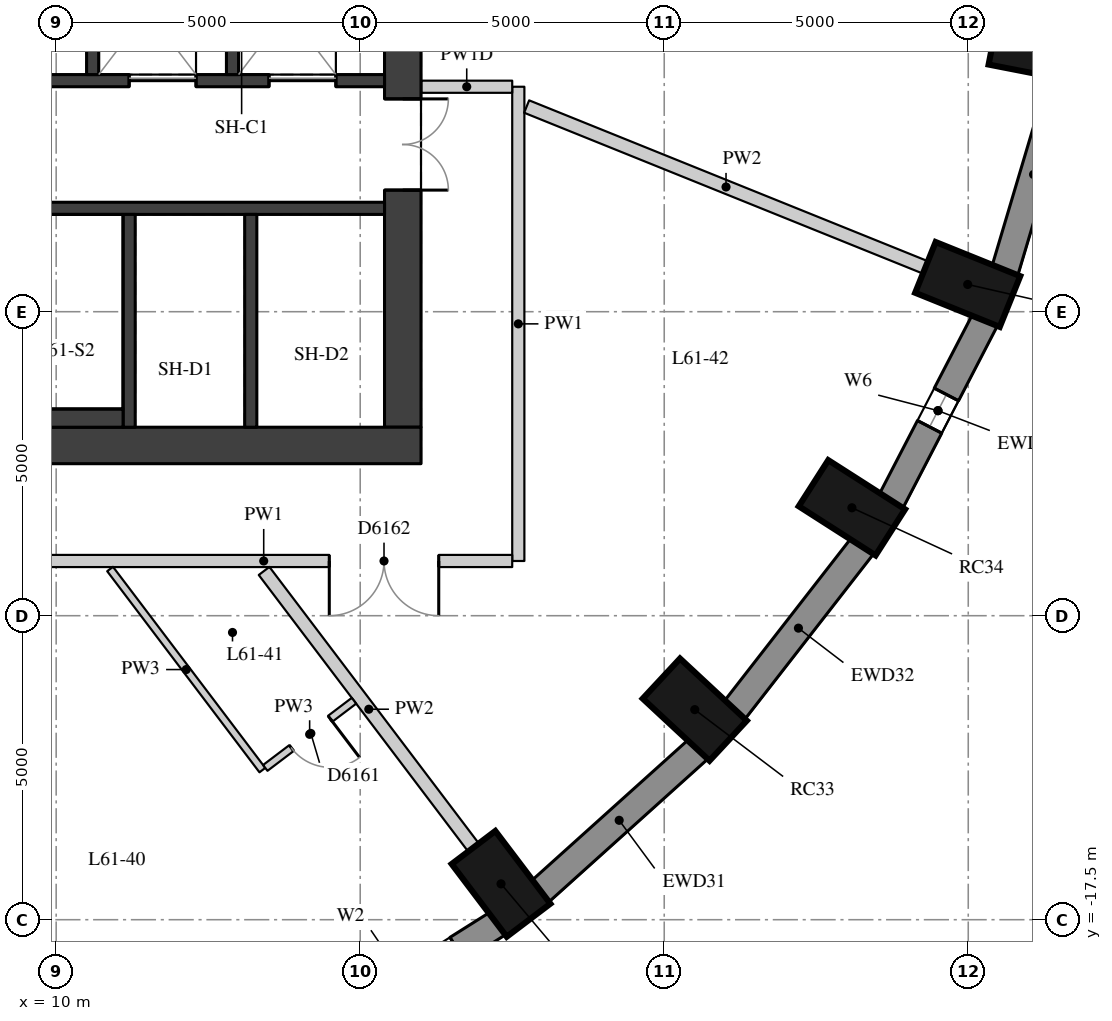
"""IFC4 building model, lengths in metres.
Left out: names, types, materials, properties, quantities, classifications, styles, units other than length and angle.
Written with IfcOpenShell. Run it as: python <this file> out.ifc"""

import sys

from ifc_helpers import new_model, si_unit, direction, frame, frame_2d, origin, origin_2d, place, context, subcontext, project, spatial, rectangle, extrude, element, fill, save


model = new_model("IFC4")
c1 = context("Model", 3, precision=1e-05, world=origin(), true_north=direction((0.0, 1.0)))
c2 = subcontext(c1, "Body", "Model", "MODEL_VIEW")
j1 = project(units=[si_unit("LENGTHUNIT", "METRE"), si_unit("PLANEANGLEUNIT", "RADIAN")], contexts=[c1])
p1 = place(None, origin())
s1 = spatial("IfcSite", under=j1, at=p1, CompositionType="ELEMENT")
p2 = place(p1, origin())
s2 = spatial("IfcBuilding", under=s1, at=p2, CompositionType="ELEMENT")
p3 = place(p2, frame((0.0, 0.0, 215.6)))
s3 = spatial("IfcBuildingStorey", under=s2, at=p3, CompositionType="ELEMENT", Elevation=215.6)
for number, where, z_axis, x_axis in (
    (1, (17.316, -16.911, 0.0), (0.0, 0.0, 1.0), (0.604, -0.797, 0.0)),
    (2, (20.502, -14.045, 0.0), (0.0, 0.0, 1.0), (0.732, -0.681, 0.0)),
    (3, (23.087, -10.725, 0.0), (0.0, 0.0, 1.0), (0.842, -0.539, 0.0)),
    (4, (24.991, -7.052, 0.0), (0.0, 0.0, 1.0), (0.927, -0.374, 0.0)),
    (5, (26.157, -3.137, 0.0), (0.0, 0.0, 1.0), (0.981, -0.192, 0.0)),
):
    element("IfcColumn", number, at=place(p3, frame(where, z_axis=z_axis, x_axis=x_axis)), inside=s3, PredefinedType="COLUMN", context=c2, shape_type="SweptSolid", body=[
        extrude(rectangle(XDim=1.5, YDim=0.9, at=origin_2d()), origin(), (0.0, 0.0, 1.0), 3.3),
    ])
p4 = place(p3, frame((14.232, -19.47, 0.0), z_axis=(0.0, 0.0, 1.0), x_axis=(0.84614984472, 0.532945063098, 0.0)))
e6 = element("IfcWall", 6, at=p4, inside=s3, PredefinedType="SOLIDWALL", context=c2, shape_type="SweptSolid", body=[
    extrude(rectangle(XDim=3.586, YDim=0.45, at=frame_2d((1.793, 0.0))), origin(), (0.0, 0.0, 1.0), 3.02),
])
p5 = place(p4, frame((0.793, 0.0, 0.4)))
e7 = element("IfcOpeningElement", 7, at=p5, cuts=e6, PredefinedType="OPENING", context=c2, shape_type="SweptSolid", body=[
    extrude(rectangle(XDim=2.0, YDim=1.75, at=frame_2d((1.0, 0.875))), frame((0.0, 0.235, 0.0), z_axis=(0.0, -1.0, 0.0), x_axis=(1.0, 0.0, 0.0)), (0.0, 0.0, 1.0), 0.47),
])
p6 = place(p3, frame((17.953, -17.04, 0.0), z_axis=(0.0, 0.0, 1.0), x_axis=(0.743442727602, 0.668799604348, 0.0)))
e8 = element("IfcWall", 8, at=p6, inside=s3, PredefinedType="SOLIDWALL", context=c2, shape_type="SweptSolid", body=[
    extrude(rectangle(XDim=3.513, YDim=0.45, at=frame_2d((1.756, 0.0))), origin(), (0.0, 0.0, 1.0), 3.02),
])
p7 = place(p3, frame((21.151, -14.061, 0.0), z_axis=(0.0, 0.0, 1.0), x_axis=(0.614255239631, 0.789107407509, 0.0)))
e9 = element("IfcWall", 9, at=p7, inside=s3, PredefinedType="SOLIDWALL", context=c2, shape_type="SweptSolid", body=[
    extrude(rectangle(XDim=3.438, YDim=0.45, at=frame_2d((1.719, 0.0))), origin(), (0.0, 0.0, 1.0), 3.02),
])
p8 = place(p3, frame((23.727, -10.624, 0.0), z_axis=(0.0, 0.0, 1.0), x_axis=(0.460175500475, 0.887827972505, 0.0)))
e10 = element("IfcWall", 10, at=p8, inside=s3, PredefinedType="SOLIDWALL", context=c2, shape_type="SweptSolid", body=[
    extrude(rectangle(XDim=3.371, YDim=0.45, at=frame_2d((1.685, 0.0))), origin(), (0.0, 0.0, 1.0), 3.02),
])
p9 = place(p8, frame((1.385, 0.0, 0.4)))
e11 = element("IfcOpeningElement", 11, at=p9, cuts=e10, PredefinedType="OPENING", context=c2, shape_type="SweptSolid", body=[
    extrude(rectangle(XDim=0.6, YDim=1.75, at=frame_2d((0.3, 0.875))), frame((0.0, 0.235, 0.0), z_axis=(0.0, -1.0, 0.0), x_axis=(1.0, 0.0, 0.0)), (0.0, 0.0, 1.0), 0.47),
])
p10 = place(p3, frame((25.6, -6.834, 0.0), z_axis=(0.0, 0.0, 1.0), x_axis=(0.285444972963, 0.958395099847, 0.0)))
e12 = element("IfcWall", 12, at=p10, inside=s3, PredefinedType="SOLIDWALL", context=c2, shape_type="SweptSolid", body=[
    extrude(rectangle(XDim=3.32, YDim=0.45, at=frame_2d((1.66, 0.0))), origin(), (0.0, 0.0, 1.0), 3.02),
])
p11 = place(p3, frame((15.7, -9.4, 0.0), z_axis=(0.0, 0.0, 1.0), x_axis=(0.0, 1.0, 0.0)))
e13 = element("IfcWall", 13, at=p11, inside=s3, PredefinedType="SHEAR", context=c2, shape_type="SweptSolid", body=[
    extrude(rectangle(XDim=18.8, YDim=0.6, at=frame_2d((9.4, 0.0))), origin(), (0.0, 0.0, 1.0), 3.02),
])
p12 = place(p11, frame((13.4, 0.0, 0.0)))
e14 = element("IfcOpeningElement", 14, at=p12, cuts=e13, PredefinedType="OPENING", context=c2, shape_type="SweptSolid", body=[
    extrude(rectangle(XDim=1.5, YDim=2.1, at=frame_2d((0.75, 1.05))), frame((0.0, 0.31, 0.0), z_axis=(0.0, -1.0, 0.0), x_axis=(1.0, 0.0, 0.0)), (0.0, 0.0, 1.0), 0.62),
])
p13 = place(p11, frame((3.9, 0.0, 0.0)))
e15 = element("IfcOpeningElement", 15, at=p13, cuts=e13, PredefinedType="OPENING", context=c2, shape_type="SweptSolid", body=[
    extrude(rectangle(XDim=1.5, YDim=2.1, at=frame_2d((0.75, 1.05))), frame((0.0, 0.31, 0.0), z_axis=(0.0, -1.0, 0.0), x_axis=(1.0, 0.0, 0.0)), (0.0, 0.0, 1.0), 0.62),
])
p14 = place(p3, frame((4.0, -9.7, 0.0), z_axis=(0.0, 0.0, 1.0), x_axis=(1.0, 0.0, 0.0)))
e16 = element("IfcWall", 16, at=p14, inside=s3, PredefinedType="SHEAR", context=c2, shape_type="SweptSolid", body=[
    extrude(rectangle(XDim=12.0, YDim=0.6, at=frame_2d((6.0, 0.0))), origin(), (0.0, 0.0, 1.0), 3.02),
])
p15 = place(p3, frame((4.6, -3.7, 0.0), z_axis=(0.0, 0.0, 1.0), x_axis=(1.0, 0.0, 0.0)))
e17 = element("IfcWall", 17, at=p15, inside=s3, PredefinedType="SHEAR", context=c2, shape_type="SweptSolid", body=[
    extrude(rectangle(XDim=10.8, YDim=0.2, at=frame_2d((5.4, 0.0))), origin(), (0.0, 0.0, 1.0), 3.02),
])
p16 = place(p15, frame((6.6, 0.0, 0.0)))
e18 = element("IfcOpeningElement", 18, at=p16, cuts=e17, PredefinedType="OPENING", context=c2, shape_type="SweptSolid", body=[
    extrude(rectangle(XDim=1.1, YDim=2.1, at=frame_2d((0.55, 1.05))), frame((0.0, 0.11, 0.0), z_axis=(0.0, -1.0, 0.0), x_axis=(1.0, 0.0, 0.0)), (0.0, 0.0, 1.0), 0.22),
])
p17 = place(p15, frame((8.9, 0.0, 0.0)))
e19 = element("IfcOpeningElement", 19, at=p17, cuts=e17, PredefinedType="OPENING", context=c2, shape_type="SweptSolid", body=[
    extrude(rectangle(XDim=1.1, YDim=2.1, at=frame_2d((0.55, 1.05))), frame((0.0, 0.11, 0.0), z_axis=(0.0, -1.0, 0.0), x_axis=(1.0, 0.0, 0.0)), (0.0, 0.0, 1.0), 0.22),
])
p18 = place(p3, frame((4.6, -5.8, 0.0), z_axis=(0.0, 0.0, 1.0), x_axis=(1.0, 0.0, 0.0)))
e20 = element("IfcWall", 20, at=p18, inside=s3, PredefinedType="SHEAR", context=c2, shape_type="SweptSolid", body=[
    extrude(rectangle(XDim=10.8, YDim=0.2, at=frame_2d((5.4, 0.0))), origin(), (0.0, 0.0, 1.0), 3.02),
])
for number, where, z_axis, x_axis in (
    (21, (11.2, -9.4, 0.0), (0.0, 0.0, 1.0), (0.0, 1.0, 0.0)),
    (22, (13.2, -9.4, 0.0), (0.0, 0.0, 1.0), (0.0, 1.0, 0.0)),
):
    element("IfcWall", number, at=place(p3, frame(where, z_axis=z_axis, x_axis=x_axis)), inside=s3, PredefinedType="SHEAR", context=c2, shape_type="SweptSolid", body=[
        extrude(rectangle(XDim=3.5, YDim=0.2, at=frame_2d((1.75, 0.0))), origin(), (0.0, 0.0, 1.0), 3.02),
    ])
for number, where, z_axis, x_axis in (
    (23, (10.6, -3.6, 0.0), (0.0, 0.0, 1.0), (0.0, 1.0, 0.0)),
    (24, (12.9, -3.6, 0.0), (0.0, 0.0, 1.0), (0.0, 1.0, 0.0)),
):
    element("IfcWall", number, at=place(p3, frame(where, z_axis=z_axis, x_axis=x_axis)), inside=s3, PredefinedType="SHEAR", context=c2, shape_type="SweptSolid", body=[
        extrude(rectangle(XDim=2.5, YDim=0.2, at=frame_2d((1.25, 0.0))), origin(), (0.0, 0.0, 1.0), 3.02),
    ])
p19 = place(p3, frame((6.22, -9.25, 0.0), z_axis=(0.0, 0.0, 1.0), x_axis=(1.0, 0.0, 0.0)))
e25 = element("IfcWall", 25, at=p19, inside=s3, PredefinedType="PARTITIONING", context=c2, shape_type="SweptSolid", body=[
    extrude(rectangle(XDim=4.88, YDim=0.3, at=frame_2d((2.44, 0.0))), origin(), (0.0, 0.0, 1.0), 3.02),
])
p20 = place(p3, frame((17.6, -3.8, 0.0), z_axis=(0.0, 0.0, 1.0), x_axis=(0.0, -1.0, 0.0)))
e26 = element("IfcWall", 26, at=p20, inside=s3, PredefinedType="PARTITIONING", context=c2, shape_type="SweptSolid", body=[
    extrude(rectangle(XDim=7.8, YDim=0.2, at=frame_2d((3.9, 0.0))), origin(), (0.0, 0.0, 1.0), 3.02),
])
p21 = place(p3, frame((17.5, -11.6, 0.0), z_axis=(0.0, 0.0, 1.0), x_axis=(-1.0, 0.0, 0.0)))
e27 = element("IfcWall", 27, at=p21, inside=s3, PredefinedType="PARTITIONING", context=c2, shape_type="SweptSolid", body=[
    extrude(rectangle(XDim=8.174, YDim=0.2, at=frame_2d((4.087, 0.0))), origin(), (0.0, 0.0, 1.0), 3.02),
])
p22 = place(p21, frame((1.208, 0.0, 0.0)))
e28 = element("IfcOpeningElement", 28, at=p22, cuts=e27, PredefinedType="OPENING", context=c2, shape_type="SweptSolid", body=[
    extrude(rectangle(XDim=1.8, YDim=2.1, at=frame_2d((0.9, 1.05))), frame((0.0, 0.11, 0.0), z_axis=(0.0, -1.0, 0.0), x_axis=(1.0, 0.0, 0.0)), (0.0, 0.0, 1.0), 0.22),
])
p23 = place(p3, frame((16.004, -3.8, 0.0), z_axis=(0.0, 0.0, 1.0), x_axis=(1.0, 0.0, 0.0)))
e29 = element("IfcWall", 29, at=p23, inside=s3, PredefinedType="PARTITIONING", context=c2, shape_type="SweptSolid", body=[
    extrude(rectangle(XDim=1.496, YDim=0.2, at=frame_2d((0.748, 0.0))), origin(), (0.0, 0.0, 1.0), 2.47),
])
p24 = place(p3, frame((16.863, -16.312, 0.0), z_axis=(0.0, 0.0, 1.0), x_axis=(-0.603636051313, 0.797260006243, 0.0)))
e30 = element("IfcWall", 30, at=p24, inside=s3, PredefinedType="PARTITIONING", context=c2, shape_type="SweptSolid", body=[
    extrude(rectangle(XDim=5.706, YDim=0.22, at=frame_2d((2.853, 0.0))), origin(), (0.0, 0.0, 1.0), 3.02),
])
p25 = place(p3, frame((24.295, -6.771, 0.0), z_axis=(0.0, 0.0, 1.0), x_axis=(-0.927375021142, 0.374133091509, 0.0)))
e31 = element("IfcWall", 31, at=p25, inside=s3, PredefinedType="PARTITIONING", context=c2, shape_type="SweptSolid", body=[
    extrude(rectangle(XDim=7.072, YDim=0.22, at=frame_2d((3.536, 0.0))), origin(), (0.0, 0.0, 1.0), 3.02),
])
p26 = place(p3, frame((10.887, -11.732, 0.0), z_axis=(0.0, 0.0, 1.0), x_axis=(0.603646932038, -0.797251767913, 0.0)))
e32 = element("IfcWall", 32, at=p26, inside=s3, PredefinedType="PARTITIONING", context=c2, shape_type="SweptSolid", body=[
    extrude(rectangle(XDim=4.149, YDim=0.12, at=frame_2d((2.074, 0.0))), origin(), (0.0, 0.0, 1.0), 3.02),
])
p27 = place(p3, frame((13.439, -15.003, 0.0), z_axis=(0.0, 0.0, 1.0), x_axis=(0.797238062708, 0.603665032422, 0.0)))
e33 = element("IfcWall", 33, at=p27, inside=s3, PredefinedType="PARTITIONING", context=c2, shape_type="SweptSolid", body=[
    extrude(rectangle(XDim=1.83, YDim=0.12, at=frame_2d((0.915, 0.0))), origin(), (0.0, 0.0, 1.0), 3.02),
])
p28 = place(p27, frame((0.54, 0.0, 0.0)))
e34 = element("IfcOpeningElement", 34, at=p28, cuts=e33, PredefinedType="OPENING", context=c2, shape_type="SweptSolid", body=[
    extrude(rectangle(XDim=0.8, YDim=2.1, at=frame_2d((0.4, 1.05))), frame((0.0, 0.07, 0.0), z_axis=(0.0, -1.0, 0.0), x_axis=(1.0, 0.0, 0.0)), (0.0, 0.0, 1.0), 0.14),
])
p29 = place(p9, origin())
e35 = element("IfcWindow", 35, at=p29, inside=s3, PartitioningType="SINGLE_PANEL", PredefinedType="WINDOW", context=c2, shape_type="SweptSolid", body=[
    extrude(rectangle(XDim=0.6, YDim=1.75, at=frame_2d((0.3, 0.875))), frame((0.0, 0.035, 0.0), z_axis=(0.0, -1.0, 0.0), x_axis=(1.0, 0.0, 0.0)), (0.0, 0.0, 1.0), 0.06),
])
fill(e11, e35)
p30 = place(p13, origin())
e36 = element("IfcDoor", 36, at=p30, inside=s3, OperationType="DOUBLE_DOOR_SINGLE_SWING", PredefinedType="DOOR", context=c2, shape_type="SweptSolid", body=[
    extrude(rectangle(XDim=1.5, YDim=2.1, at=frame_2d((0.75, 1.05))), frame((0.0, 0.025, 0.0), z_axis=(0.0, -1.0, 0.0), x_axis=(1.0, 0.0, 0.0)), (0.0, 0.0, 1.0), 0.05),
])
fill(e15, e36)
p31 = place(p16, origin())
e37 = element("IfcDoor", 37, at=p31, inside=s3, OperationType="DOUBLE_DOOR_SLIDING", PredefinedType="DOOR", context=c2, shape_type="SweptSolid", body=[
    extrude(rectangle(XDim=1.1, YDim=2.1, at=frame_2d((0.55, 1.05))), frame((0.0, 0.025, 0.0), z_axis=(0.0, -1.0, 0.0), x_axis=(1.0, 0.0, 0.0)), (0.0, 0.0, 1.0), 0.05),
])
fill(e18, e37)
p32 = place(p17, origin())
e38 = element("IfcDoor", 38, at=p32, inside=s3, OperationType="DOUBLE_DOOR_SLIDING", PredefinedType="DOOR", context=c2, shape_type="SweptSolid", body=[
    extrude(rectangle(XDim=1.1, YDim=2.1, at=frame_2d((0.55, 1.05))), frame((0.0, 0.025, 0.0), z_axis=(0.0, -1.0, 0.0), x_axis=(1.0, 0.0, 0.0)), (0.0, 0.0, 1.0), 0.05),
])
fill(e19, e38)
p33 = place(p28, origin())
e39 = element("IfcDoor", 39, at=p33, inside=s3, OperationType="SINGLE_SWING_LEFT", PredefinedType="DOOR", context=c2, shape_type="SweptSolid", body=[
    extrude(rectangle(XDim=0.8, YDim=2.1, at=frame_2d((0.4, 1.05))), frame((0.0, 0.025, 0.0), z_axis=(0.0, -1.0, 0.0), x_axis=(1.0, 0.0, 0.0)), (0.0, 0.0, 1.0), 0.05),
])
fill(e34, e39)
p34 = place(p22, origin())
e40 = element("IfcDoor", 40, at=p34, inside=s3, OperationType="DOUBLE_DOOR_SINGLE_SWING", PredefinedType="DOOR", context=c2, shape_type="SweptSolid", body=[
    extrude(rectangle(XDim=1.8, YDim=2.1, at=frame_2d((0.9, 1.05))), frame((0.0, 0.025, 0.0), z_axis=(0.0, -1.0, 0.0), x_axis=(1.0, 0.0, 0.0)), (0.0, 0.0, 1.0), 0.05),
])
fill(e28, e40)
save(model, sys.argv[1])
